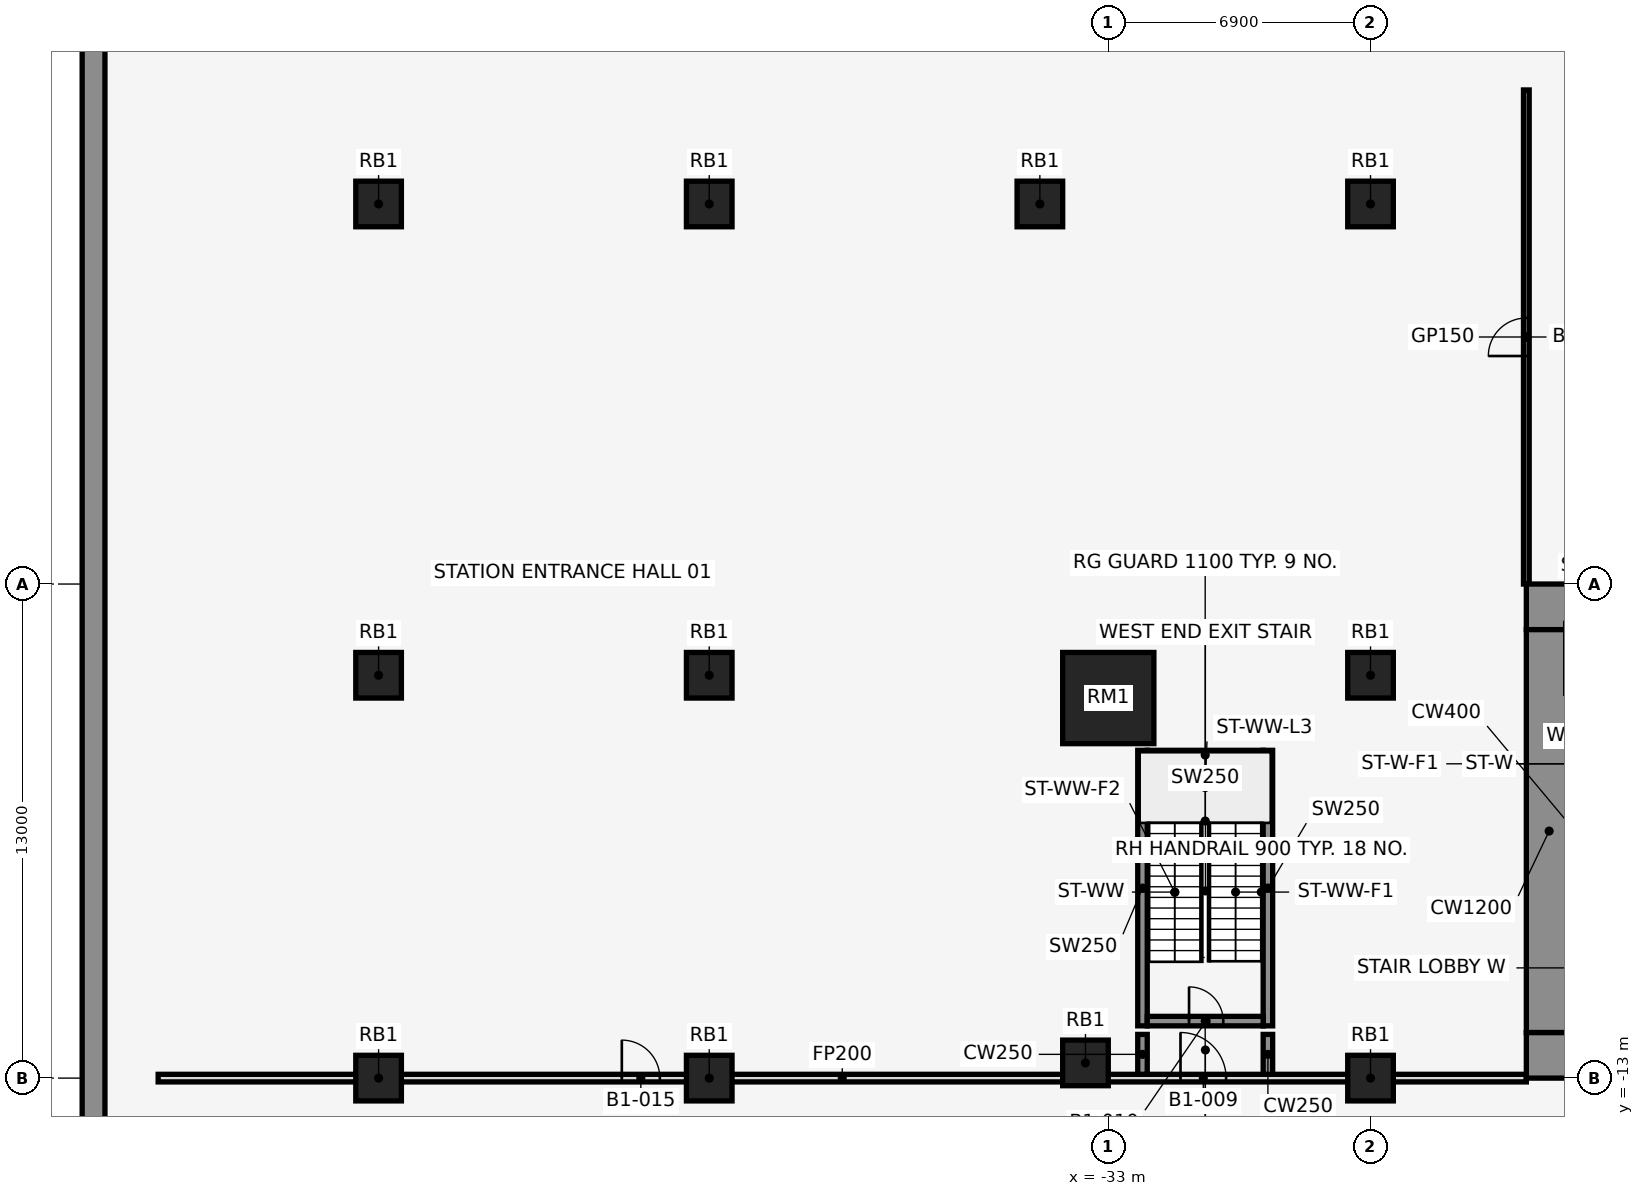
"""IFC4 building model, lengths in metres.
Left out: names, types, materials, properties, quantities, classifications, styles, units other than length and angle.
Written with IfcOpenShell. Run it as: python <this file> out.ifc"""

import sys

from ifc_helpers import new_model, si_unit, direction, frame, frame_2d, origin, origin_2d, place, context, subcontext, project, spatial, rectangle, extrude, element, fill, save


model = new_model("IFC4")
c1 = context("Model", 3, precision=1e-05, world=origin(), true_north=direction((0.0, 1.0)))
c2 = subcontext(c1, "Body", "Model", "MODEL_VIEW")
j1 = project(units=[si_unit("LENGTHUNIT", "METRE"), si_unit("PLANEANGLEUNIT", "RADIAN")], contexts=[c1])
p1 = place(None, origin())
s1 = spatial("IfcSite", under=j1, at=p1, CompositionType="ELEMENT")
p2 = place(p1, origin())
s2 = spatial("IfcBuilding", under=s1, at=p2, CompositionType="ELEMENT")
p3 = place(p2, frame((0.0, 0.0, -5.0)))
s3 = spatial("IfcBuildingStorey", under=s2, at=p3, CompositionType="ELEMENT", Elevation=-5.0)
p4 = place(p3, frame((-33.0, -3.0, 0.0), z_axis=(0.0, 0.0, 1.0), x_axis=(1.0, 0.0, 0.0)))
e1 = element("IfcColumn", 1, at=p4, inside=s3, PredefinedType="COLUMN", context=c2, shape_type="SweptSolid", body=[
    extrude(rectangle(XDim=2.4, YDim=2.4, at=origin_2d()), origin(), (0.0, 0.0, 1.0), 5.0),
])
for number, where, z_axis, x_axis in (
    (2, (-26.1, -2.4, 0.0), (0.0, 0.0, 1.0), (1.0, 0.0, 0.0)),
    (3, (-33.6, -12.6, 0.0), (0.0, 0.0, 1.0), (1.0, 0.0, 0.0)),
    (4, (-52.2, 10.0, 0.0), (0.0, 0.0, 1.0), (1.0, 0.0, 0.0)),
    (5, (-52.2, -2.4, 0.0), (0.0, 0.0, 1.0), (1.0, 0.0, 0.0)),
    (6, (-52.2, -13.0, 0.0), (0.0, 0.0, 1.0), (1.0, 0.0, 0.0)),
):
    element("IfcColumn", number, at=place(p3, frame(where, z_axis=z_axis, x_axis=x_axis)), inside=s3, PredefinedType="COLUMN", context=c2, shape_type="SweptSolid", body=[
        extrude(rectangle(XDim=1.2, YDim=1.2, at=origin_2d()), origin(), (0.0, 0.0, 1.0), 5.0),
    ])
p5 = place(p3, frame((-43.5, 10.0, 0.0), z_axis=(0.0, 0.0, 1.0), x_axis=(1.0, 0.0, 0.0)))
e7 = element("IfcColumn", 7, at=p5, inside=s3, PredefinedType="COLUMN", context=c2, shape_type="SweptSolid", body=[
    extrude(rectangle(XDim=1.2, YDim=1.2, at=origin_2d()), origin(), (0.0, 0.0, 1.0), 4.4),
])
for number, where, z_axis, x_axis in (
    (8, (-43.5, -2.4, 0.0), (0.0, 0.0, 1.0), (1.0, 0.0, 0.0)),
    (9, (-43.5, -13.0, 0.0), (0.0, 0.0, 1.0), (1.0, 0.0, 0.0)),
):
    element("IfcColumn", number, at=place(p3, frame(where, z_axis=z_axis, x_axis=x_axis)), inside=s3, PredefinedType="COLUMN", context=c2, shape_type="SweptSolid", body=[
        extrude(rectangle(XDim=1.2, YDim=1.2, at=origin_2d()), origin(), (0.0, 0.0, 1.0), 5.0),
    ])
for number, where, z_axis, x_axis in (
    (10, (-34.8, 10.0, 0.0), (0.0, 0.0, 1.0), (1.0, 0.0, 0.0)),
    (11, (-26.1, 10.0, 0.0), (0.0, 0.0, 1.0), (1.0, 0.0, 0.0)),
):
    element("IfcColumn", number, at=place(p3, frame(where, z_axis=z_axis, x_axis=x_axis)), inside=s3, PredefinedType="COLUMN", context=c2, shape_type="SweptSolid", body=[
        extrude(rectangle(XDim=1.2, YDim=1.2, at=origin_2d()), origin(), (0.0, 0.0, 1.0), 4.4),
    ])
p6 = place(p3, frame((-26.1, -13.0, 0.0), z_axis=(0.0, 0.0, 1.0), x_axis=(1.0, 0.0, 0.0)))
e12 = element("IfcColumn", 12, at=p6, inside=s3, PredefinedType="COLUMN", context=c2, shape_type="SweptSolid", body=[
    extrude(rectangle(XDim=1.2, YDim=1.2, at=origin_2d()), origin(), (0.0, 0.0, 1.0), 5.0),
])
p7 = place(p3, frame((-59.7, -61.4, 0.0), z_axis=(0.0, 0.0, 1.0), x_axis=(0.0, 1.0, 0.0)))
e13 = element("IfcWall", 13, at=p7, inside=s3, PredefinedType="SOLIDWALL", context=c2, shape_type="SweptSolid", body=[
    extrude(rectangle(XDim=80.8, YDim=0.6, at=frame_2d((40.4, 0.0))), origin(), (0.0, 0.0, 1.0), 5.0),
])
for number, where, z_axis, x_axis in (
    (14, (-32.1, -11.625, 0.0), (0.0, 0.0, 1.0), (0.0, 1.0, 0.0)),
    (15, (-28.8, -11.625, 0.0), (0.0, 0.0, 1.0), (0.0, 1.0, 0.0)),
):
    element("IfcWall", number, at=place(p3, frame(where, z_axis=z_axis, x_axis=x_axis)), inside=s3, PredefinedType="SHEAR", context=c2, shape_type="SweptSolid", body=[
        extrude(rectangle(XDim=7.25, YDim=0.25, at=frame_2d((3.625, 0.0))), origin(), (0.0, 0.0, 1.0), 5.0),
    ])
p8 = place(p3, frame((-31.975, -11.5, 0.0), z_axis=(0.0, 0.0, 1.0), x_axis=(1.0, 0.0, 0.0)))
e16 = element("IfcWall", 16, at=p8, inside=s3, PredefinedType="SHEAR", context=c2, shape_type="SweptSolid", body=[
    extrude(rectangle(XDim=3.05, YDim=0.25, at=frame_2d((1.525, 0.0))), origin(), (0.0, 0.0, 1.0), 5.0),
])
p9 = place(p8, frame((1.1, 0.0, 0.0)))
e17 = element("IfcOpeningElement", 17, at=p9, cuts=e16, PredefinedType="OPENING", context=c2, shape_type="SweptSolid", body=[
    extrude(rectangle(XDim=0.9, YDim=2.1, at=frame_2d((0.45, 1.05))), frame((0.0, 0.137, 0.0), z_axis=(0.0, -1.0, 0.0), x_axis=(1.0, 0.0, 0.0)), (0.0, 0.0, 1.0), 0.274),
])
p10 = place(p3, frame((-31.975, -4.5, 0.0), z_axis=(0.0, 0.0, 1.0), x_axis=(1.0, 0.0, 0.0)))
e18 = element("IfcWall", 18, at=p10, inside=s3, PredefinedType="SHEAR", context=c2, shape_type="SweptSolid", body=[
    extrude(rectangle(XDim=3.05, YDim=0.25, at=frame_2d((1.525, 0.0))), origin(), (0.0, 0.0, 1.0), 5.0),
])
p11 = place(p3, frame((-58.0, -13.0, 0.0), z_axis=(0.0, 0.0, 1.0), x_axis=(1.0, 0.0, 0.0)))
e19 = element("IfcWall", 19, at=p11, inside=s3, PredefinedType="PARTITIONING", context=c2, shape_type="SweptSolid", body=[
    extrude(rectangle(XDim=36.0, YDim=0.2, at=frame_2d((18.0, 0.0))), origin(), (0.0, 0.0, 1.0), 4.7),
])
p12 = place(p11, frame((26.9, 0.0, 0.0)))
e20 = element("IfcOpeningElement", 20, at=p12, cuts=e19, PredefinedType="OPENING", context=c2, shape_type="SweptSolid", body=[
    extrude(rectangle(XDim=1.2, YDim=2.1, at=frame_2d((0.6, 1.05))), frame((0.0, 0.112, 0.0), z_axis=(0.0, -1.0, 0.0), x_axis=(1.0, 0.0, 0.0)), (0.0, 0.0, 1.0), 0.224),
])
p13 = place(p11, frame((12.2, 0.0, 0.0)))
e21 = element("IfcOpeningElement", 21, at=p13, cuts=e19, PredefinedType="OPENING", context=c2, shape_type="SweptSolid", body=[
    extrude(rectangle(XDim=1.0, YDim=2.1, at=frame_2d((0.5, 1.05))), frame((0.0, 0.112, 0.0), z_axis=(0.0, -1.0, 0.0), x_axis=(1.0, 0.0, 0.0)), (0.0, 0.0, 1.0), 0.224),
])
for number, where, z_axis, x_axis in (
    (22, (-32.1, -12.9, 0.0), (0.0, 0.0, 1.0), (0.0, 1.0, 0.0)),
    (23, (-28.8, -12.9, 0.0), (0.0, 0.0, 1.0), (0.0, 1.0, 0.0)),
):
    element("IfcWall", number, at=place(p3, frame(where, z_axis=z_axis, x_axis=x_axis)), inside=s3, PredefinedType="SHEAR", context=c2, shape_type="SweptSolid", body=[
        extrude(rectangle(XDim=1.05, YDim=0.25, at=frame_2d((0.525, 0.0))), origin(), (0.0, 0.0, 1.0), 5.0),
    ])
p14 = place(p3, frame((-22.0, 0.0, 0.0), z_axis=(0.0, 0.0, 1.0), x_axis=(0.0, 1.0, 0.0)))
e24 = element("IfcWall", 24, at=p14, inside=s3, PredefinedType="PARTITIONING", context=c2, shape_type="SweptSolid", body=[
    extrude(rectangle(XDim=13.0, YDim=0.15, at=frame_2d((6.5, 0.0))), origin(), (0.0, 0.0, 1.0), 4.7),
])
p15 = place(p14, frame((6.0, 0.0, 0.0)))
e25 = element("IfcOpeningElement", 25, at=p15, cuts=e24, PredefinedType="OPENING", context=c2, shape_type="SweptSolid", body=[
    extrude(rectangle(XDim=1.0, YDim=2.1, at=frame_2d((0.5, 1.05))), frame((0.0, 0.087, 0.0), z_axis=(0.0, -1.0, 0.0), x_axis=(1.0, 0.0, 0.0)), (0.0, 0.0, 1.0), 0.174),
])
p16 = place(p3, frame((-22.0, -0.6, 0.0), z_axis=(0.0, 0.0, 1.0), x_axis=(1.0, 0.0, 0.0)))
e26 = element("IfcWall", 26, at=p16, inside=s3, PredefinedType="SHEAR", context=c2, shape_type="SweptSolid", body=[
    extrude(rectangle(XDim=44.0, YDim=1.2, at=frame_2d((22.0, 0.0))), origin(), (0.0, 0.0, 1.0), 5.0),
])
p17 = place(p3, frame((-22.0, -12.4, 0.0), z_axis=(0.0, 0.0, 1.0), x_axis=(1.0, 0.0, 0.0)))
e27 = element("IfcWall", 27, at=p17, inside=s3, PredefinedType="SHEAR", context=c2, shape_type="SweptSolid", body=[
    extrude(rectangle(XDim=44.0, YDim=1.2, at=frame_2d((22.0, 0.0))), origin(), (0.0, 0.0, 1.0), 5.0),
])
p18 = place(p17, frame((2.2, 0.0, 0.0)))
e28 = element("IfcOpeningElement", 28, at=p18, cuts=e27, PredefinedType="OPENING", context=c2, shape_type="SweptSolid", body=[
    extrude(rectangle(XDim=1.2, YDim=2.1, at=frame_2d((0.6, 1.05))), frame((0.0, 0.612, 0.0), z_axis=(0.0, -1.0, 0.0), x_axis=(1.0, 0.0, 0.0)), (0.0, 0.0, 1.0), 1.224),
])
p19 = place(p17, frame((21.4, 0.0, 0.0)))
e29 = element("IfcOpeningElement", 29, at=p19, cuts=e27, PredefinedType="OPENING", context=c2, shape_type="SweptSolid", body=[
    extrude(rectangle(XDim=1.2, YDim=2.1, at=frame_2d((0.6, 1.05))), frame((0.0, 0.612, 0.0), z_axis=(0.0, -1.0, 0.0), x_axis=(1.0, 0.0, 0.0)), (0.0, 0.0, 1.0), 1.224),
])
p20 = place(p17, frame((40.6, 0.0, 0.0)))
e30 = element("IfcOpeningElement", 30, at=p20, cuts=e27, PredefinedType="OPENING", context=c2, shape_type="SweptSolid", body=[
    extrude(rectangle(XDim=1.2, YDim=2.1, at=frame_2d((0.6, 1.05))), frame((0.0, 0.612, 0.0), z_axis=(0.0, -1.0, 0.0), x_axis=(1.0, 0.0, 0.0)), (0.0, 0.0, 1.0), 1.224),
])
p21 = place(p17, frame((16.0, 0.0, 0.0)))
e31 = element("IfcOpeningElement", 31, at=p21, cuts=e27, PredefinedType="OPENING", context=c2, shape_type="SweptSolid", body=[
    extrude(rectangle(XDim=1.8, YDim=2.1, at=frame_2d((0.9, 1.05))), frame((0.0, 0.612, 0.0), z_axis=(0.0, -1.0, 0.0), x_axis=(1.0, 0.0, 0.0)), (0.0, 0.0, 1.0), 1.224),
])
p22 = place(p17, frame((6.3, 0.0, 0.0)))
e32 = element("IfcOpeningElement", 32, at=p22, cuts=e27, PredefinedType="OPENING", context=c2, shape_type="SweptSolid", body=[
    extrude(rectangle(XDim=1.2, YDim=2.1, at=frame_2d((0.6, 1.05))), frame((0.0, 0.612, 0.0), z_axis=(0.0, -1.0, 0.0), x_axis=(1.0, 0.0, 0.0)), (0.0, 0.0, 1.0), 1.224),
])
p23 = place(p17, frame((26.2, 0.0, 0.0)))
e33 = element("IfcOpeningElement", 33, at=p23, cuts=e27, PredefinedType="OPENING", context=c2, shape_type="SweptSolid", body=[
    extrude(rectangle(XDim=1.8, YDim=2.1, at=frame_2d((0.9, 1.05))), frame((0.0, 0.612, 0.0), z_axis=(0.0, -1.0, 0.0), x_axis=(1.0, 0.0, 0.0)), (0.0, 0.0, 1.0), 1.224),
])
p24 = place(p17, frame((36.5, 0.0, 0.0)))
e34 = element("IfcOpeningElement", 34, at=p24, cuts=e27, PredefinedType="OPENING", context=c2, shape_type="SweptSolid", body=[
    extrude(rectangle(XDim=1.2, YDim=2.1, at=frame_2d((0.6, 1.05))), frame((0.0, 0.612, 0.0), z_axis=(0.0, -1.0, 0.0), x_axis=(1.0, 0.0, 0.0)), (0.0, 0.0, 1.0), 1.224),
])
p25 = place(p3, frame((-21.4, -11.8, 0.0), z_axis=(0.0, 0.0, 1.0), x_axis=(0.0, 1.0, 0.0)))
e35 = element("IfcWall", 35, at=p25, inside=s3, PredefinedType="SHEAR", context=c2, shape_type="SweptSolid", body=[
    extrude(rectangle(XDim=10.6, YDim=1.2, at=frame_2d((5.3, 0.0))), origin(), (0.0, 0.0, 1.0), 5.0),
])
p26 = place(p12, origin())
e36 = element("IfcDoor", 36, at=p26, inside=s3, OperationType="SINGLE_SWING_RIGHT", PredefinedType="DOOR", context=c2, shape_type="SweptSolid", body=[
    extrude(rectangle(XDim=1.2, YDim=2.1, at=frame_2d((0.6, 1.05))), frame((0.0, 0.025, 0.0), z_axis=(0.0, -1.0, 0.0), x_axis=(1.0, 0.0, 0.0)), (0.0, 0.0, 1.0), 0.05),
])
fill(e20, e36)
p27 = place(p9, origin())
e37 = element("IfcDoor", 37, at=p27, inside=s3, OperationType="SINGLE_SWING_LEFT", PredefinedType="DOOR", context=c2, shape_type="SweptSolid", body=[
    extrude(rectangle(XDim=0.9, YDim=2.1, at=frame_2d((0.45, 1.05))), frame((0.0, 0.025, 0.0), z_axis=(0.0, -1.0, 0.0), x_axis=(1.0, 0.0, 0.0)), (0.0, 0.0, 1.0), 0.05),
])
fill(e17, e37)
p28 = place(p13, origin())
e38 = element("IfcDoor", 38, at=p28, inside=s3, OperationType="SINGLE_SWING_RIGHT", PredefinedType="DOOR", context=c2, shape_type="SweptSolid", body=[
    extrude(rectangle(XDim=1.0, YDim=2.1, at=frame_2d((0.5, 1.05))), frame((0.0, 0.025, 0.0), z_axis=(0.0, -1.0, 0.0), x_axis=(1.0, 0.0, 0.0)), (0.0, 0.0, 1.0), 0.05),
])
fill(e21, e38)
p29 = place(p15, frame((1.0, 0.0, 0.0), z_axis=(0.0, 0.0, 1.0), x_axis=(-1.0, 0.0, 0.0)))
e39 = element("IfcDoor", 39, at=p29, inside=s3, OperationType="SINGLE_SWING_RIGHT", PredefinedType="DOOR", context=c2, shape_type="SweptSolid", body=[
    extrude(rectangle(XDim=1.0, YDim=2.1, at=frame_2d((0.5, 1.05))), frame((0.0, 0.025, 0.0), z_axis=(0.0, -1.0, 0.0), x_axis=(1.0, 0.0, 0.0)), (0.0, 0.0, 1.0), 0.05),
])
fill(e25, e39)
save(model, sys.argv[1])
